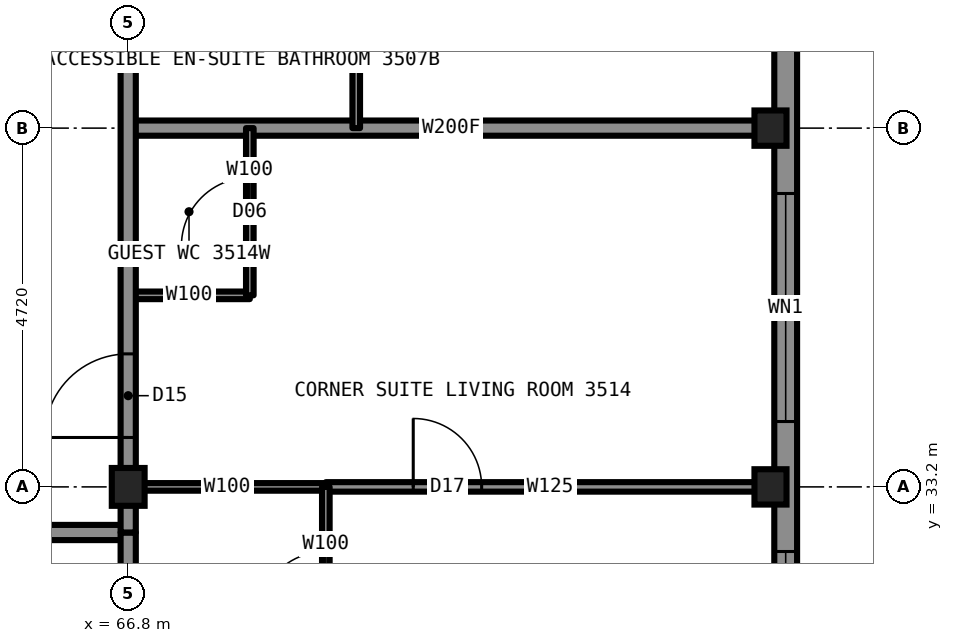
"""IFC4 building model, lengths in metres.
Left out: names, types, materials, properties, quantities, classifications, styles, units other than length and angle.
Written with IfcOpenShell. Run it as: python <this file> out.ifc"""

import sys

from ifc_helpers import new_model, si_unit, direction, frame, frame_2d, origin, origin_2d, place, context, subcontext, project, spatial, rectangle, i_section, extrude, element, fill, save


model = new_model("IFC4")
c1 = context("Model", 3, precision=1e-05, world=origin(), true_north=direction((0.0, 1.0)))
c2 = subcontext(c1, "Body", "Model", "MODEL_VIEW")
j1 = project(units=[si_unit("LENGTHUNIT", "METRE"), si_unit("PLANEANGLEUNIT", "RADIAN")], contexts=[c1])
p1 = place(None, origin())
s1 = spatial("IfcSite", under=j1, at=p1, CompositionType="ELEMENT")
p2 = place(p1, origin())
s2 = spatial("IfcBuilding", under=s1, at=p2, CompositionType="ELEMENT")
p3 = place(p2, frame((0.0, 0.0, 124.9)))
s3 = spatial("IfcBuildingStorey", under=s2, at=p3, CompositionType="ELEMENT", Elevation=124.9)
for number, where, z_axis, x_axis in (
    (1, (75.25, 33.2, 0.0), (0.0, 0.0, 1.0), (1.0, 0.0, 0.0)),
    (2, (75.25, 37.92, 0.0), (0.0, 0.0, 1.0), (1.0, 0.0, 0.0)),
):
    element("IfcColumn", number, at=place(p3, frame(where, z_axis=z_axis, x_axis=x_axis)), inside=s3, PredefinedType="COLUMN", context=c2, shape_type="SweptSolid", body=[
        extrude(i_section(OverallWidth=0.422, OverallDepth=0.465, WebThickness=0.045, FlangeThickness=0.073, at=origin_2d()), origin(), (0.0, 0.0, 1.0), 3.5),
    ])
p4 = place(p3, frame((66.8, 33.2, 0.0), z_axis=(0.0, 0.0, 1.0), x_axis=(1.0, 0.0, 0.0)))
e3 = element("IfcColumn", 3, at=p4, inside=s3, PredefinedType="COLUMN", context=c2, shape_type="SweptSolid", body=[
    extrude(i_section(OverallWidth=0.432, OverallDepth=0.498, WebThickness=0.056, FlangeThickness=0.089, at=origin_2d()), origin(), (0.0, 0.0, 1.0), 3.5),
])
p5 = place(p3, frame((66.8, 33.2, 0.0), z_axis=(0.0, 0.0, 1.0), x_axis=(1.0, 0.0, 0.0)))
e4 = element("IfcWall", 4, at=p5, inside=s3, PredefinedType="PARTITIONING", context=c2, shape_type="SweptSolid", body=[
    extrude(rectangle(XDim=2.6, YDim=0.1, at=frame_2d((1.3, 0.0))), origin(), (0.0, 0.0, 1.0), 2.573),
])
p6 = place(p3, frame((69.4, 33.2, 0.0), z_axis=(0.0, 0.0, 1.0), x_axis=(1.0, 0.0, 0.0)))
e5 = element("IfcWall", 5, at=p6, inside=s3, PredefinedType="PARTITIONING", context=c2, shape_type="SweptSolid", body=[
    extrude(rectangle(XDim=5.9, YDim=0.125, at=frame_2d((2.95, 0.0))), origin(), (0.0, 0.0, 1.0), 2.573),
])
p7 = place(p6, frame((1.15, 0.0, 0.0)))
e6 = element("IfcOpeningElement", 6, at=p7, cuts=e5, PredefinedType="OPENING", context=c2, shape_type="SweptSolid", body=[
    extrude(rectangle(XDim=0.9, YDim=2.2, at=frame_2d((0.45, 1.1))), frame((0.0, 0.073, 0.0), z_axis=(0.0, -1.0, 0.0), x_axis=(1.0, 0.0, 0.0)), (0.0, 0.0, 1.0), 0.145),
])
p8 = place(p3, frame((43.2, 32.6, 0.0), z_axis=(0.0, 0.0, 1.0), x_axis=(1.0, 0.0, 0.0)))
e7 = element("IfcWall", 7, at=p8, inside=s3, PredefinedType="PARTITIONING", context=c2, shape_type="SweptSolid", body=[
    extrude(rectangle(XDim=23.6, YDim=0.2, at=frame_2d((11.8, 0.0))), origin(), (0.0, 0.0, 1.0), 3.33),
])
p9 = place(p8, frame((3.0, 0.0, 0.0)))
e8 = element("IfcOpeningElement", 8, at=p9, cuts=e7, PredefinedType="OPENING", context=c2, shape_type="SweptSolid", body=[
    extrude(rectangle(XDim=1.0, YDim=2.2, at=frame_2d((0.5, 1.1))), frame((0.0, 0.11, 0.0), z_axis=(0.0, -1.0, 0.0), x_axis=(1.0, 0.0, 0.0)), (0.0, 0.0, 1.0), 0.22),
])
p10 = place(p8, frame((11.29, 0.0, 0.0)))
e9 = element("IfcOpeningElement", 9, at=p10, cuts=e7, PredefinedType="OPENING", context=c2, shape_type="SweptSolid", body=[
    extrude(rectangle(XDim=1.1, YDim=2.2, at=frame_2d((0.55, 1.1))), frame((0.0, 0.11, 0.0), z_axis=(0.0, -1.0, 0.0), x_axis=(1.0, 0.0, 0.0)), (0.0, 0.0, 1.0), 0.22),
])
p11 = place(p3, frame((66.8, 37.92, 0.0), z_axis=(0.0, 0.0, 1.0), x_axis=(1.0, 0.0, 0.0)))
e10 = element("IfcWall", 10, at=p11, inside=s3, PredefinedType="PARTITIONING", context=c2, shape_type="SweptSolid", body=[
    extrude(rectangle(XDim=8.5, YDim=0.2, at=frame_2d((4.25, 0.0))), origin(), (0.0, 0.0, 1.0), 2.573),
])
p12 = place(p3, frame((66.8, 35.72, 0.0), z_axis=(0.0, 0.0, 1.0), x_axis=(1.0, 0.0, 0.0)))
e11 = element("IfcWall", 11, at=p12, inside=s3, PredefinedType="PARTITIONING", context=c2, shape_type="SweptSolid", body=[
    extrude(rectangle(XDim=1.6, YDim=0.1, at=frame_2d((0.8, 0.0))), origin(), (0.0, 0.0, 1.0), 3.33),
])
p13 = place(p3, frame((66.8, 33.22, 0.0), z_axis=(0.0, 0.0, 1.0), x_axis=(0.0, 1.0, 0.0)))
e12 = element("IfcWall", 12, at=p13, inside=s3, PredefinedType="PARTITIONING", context=c2, shape_type="SweptSolid", body=[
    extrude(rectangle(XDim=23.58, YDim=0.2, at=frame_2d((11.79, 0.0))), origin(), (0.0, 0.0, 1.0), 3.33),
])
p14 = place(p13, frame((7.85, 0.0, 0.0)))
e13 = element("IfcOpeningElement", 13, at=p14, cuts=e12, PredefinedType="OPENING", context=c2, shape_type="SweptSolid", body=[
    extrude(rectangle(XDim=1.0, YDim=2.2, at=frame_2d((0.5, 1.1))), frame((0.0, 0.11, 0.0), z_axis=(0.0, -1.0, 0.0), x_axis=(1.0, 0.0, 0.0)), (0.0, 0.0, 1.0), 0.22),
])
p15 = place(p13, frame((12.42, 0.0, 0.0)))
e14 = element("IfcOpeningElement", 14, at=p15, cuts=e12, PredefinedType="OPENING", context=c2, shape_type="SweptSolid", body=[
    extrude(rectangle(XDim=1.0, YDim=2.2, at=frame_2d((0.5, 1.1))), frame((0.0, 0.11, 0.0), z_axis=(0.0, -1.0, 0.0), x_axis=(1.0, 0.0, 0.0)), (0.0, 0.0, 1.0), 0.22),
])
p16 = place(p13, frame((21.83, 0.0, 0.0)))
e15 = element("IfcOpeningElement", 15, at=p16, cuts=e12, PredefinedType="OPENING", context=c2, shape_type="SweptSolid", body=[
    extrude(rectangle(XDim=1.1, YDim=2.2, at=frame_2d((0.55, 1.1))), frame((0.0, 0.11, 0.0), z_axis=(0.0, -1.0, 0.0), x_axis=(1.0, 0.0, 0.0)), (0.0, 0.0, 1.0), 0.22),
])
p17 = place(p13, frame((0.63, 0.0, 0.0)))
e16 = element("IfcOpeningElement", 16, at=p17, cuts=e12, PredefinedType="OPENING", context=c2, shape_type="SweptSolid", body=[
    extrude(rectangle(XDim=1.1, YDim=2.2, at=frame_2d((0.55, 1.1))), frame((0.0, 0.11, 0.0), z_axis=(0.0, -1.0, 0.0), x_axis=(1.0, 0.0, 0.0)), (0.0, 0.0, 1.0), 0.22),
])
p18 = place(p3, frame((66.8, 24.7, 0.0), z_axis=(0.0, 0.0, 1.0), x_axis=(0.0, 1.0, 0.0)))
e17 = element("IfcWall", 17, at=p18, inside=s3, PredefinedType="PARTITIONING", context=c2, shape_type="SweptSolid", body=[
    extrude(rectangle(XDim=7.9, YDim=0.2, at=frame_2d((3.95, 0.0))), origin(), (0.0, 0.0, 1.0), 2.573),
])
p19 = place(p3, frame((68.4, 35.72, 0.0), z_axis=(0.0, 0.0, 1.0), x_axis=(0.0, 1.0, 0.0)))
e18 = element("IfcWall", 18, at=p19, inside=s3, PredefinedType="PARTITIONING", context=c2, shape_type="SweptSolid", body=[
    extrude(rectangle(XDim=2.2, YDim=0.1, at=frame_2d((1.1, 0.0))), origin(), (0.0, 0.0, 1.0), 3.33),
])
p20 = place(p19, frame((0.65, 0.0, 0.0)))
e19 = element("IfcOpeningElement", 19, at=p20, cuts=e18, PredefinedType="OPENING", context=c2, shape_type="SweptSolid", body=[
    extrude(rectangle(XDim=0.9, YDim=2.1, at=frame_2d((0.45, 1.05))), frame((0.0, 0.06, 0.0), z_axis=(0.0, -1.0, 0.0), x_axis=(1.0, 0.0, 0.0)), (0.0, 0.0, 1.0), 0.12),
])
p21 = place(p3, frame((69.4, 30.6, 0.0), z_axis=(0.0, 0.0, 1.0), x_axis=(0.0, 1.0, 0.0)))
e20 = element("IfcWall", 20, at=p21, inside=s3, PredefinedType="PARTITIONING", context=c2, shape_type="SweptSolid", body=[
    extrude(rectangle(XDim=2.6, YDim=0.1, at=frame_2d((1.3, 0.0))), origin(), (0.0, 0.0, 1.0), 3.33),
])
p22 = place(p21, frame((0.85, 0.0, 0.0)))
e21 = element("IfcOpeningElement", 21, at=p22, cuts=e20, PredefinedType="OPENING", context=c2, shape_type="SweptSolid", body=[
    extrude(rectangle(XDim=0.9, YDim=2.1, at=frame_2d((0.45, 1.05))), frame((0.0, 0.06, 0.0), z_axis=(0.0, -1.0, 0.0), x_axis=(1.0, 0.0, 0.0)), (0.0, 0.0, 1.0), 0.12),
])
p23 = place(p3, frame((69.8, 37.92, 0.0), z_axis=(0.0, 0.0, 1.0), x_axis=(0.0, 1.0, 0.0)))
e22 = element("IfcWall", 22, at=p23, inside=s3, PredefinedType="PARTITIONING", context=c2, shape_type="SweptSolid", body=[
    extrude(rectangle(XDim=2.9, YDim=0.1, at=frame_2d((1.45, 0.0))), origin(), (0.0, 0.0, 1.0), 3.33),
])
p24 = place(p3, frame((75.45, 29.9, 0.0), z_axis=(0.0, 0.0, 1.0), x_axis=(0.0, 1.0, 0.0)))
e23 = element("IfcWall", 23, at=p24, inside=s3, PredefinedType="SOLIDWALL", context=c2, shape_type="SweptSolid", body=[
    extrude(rectangle(XDim=30.2, YDim=0.3, at=frame_2d((15.1, 0.0))), origin(), (0.0, 0.0, 1.0), 2.83),
])
p25 = place(p24, frame((0.85, 0.0, 0.5)))
e24 = element("IfcOpeningElement", 24, at=p25, cuts=e23, PredefinedType="OPENING", context=c2, shape_type="SweptSolid", body=[
    extrude(rectangle(XDim=1.6, YDim=2.0, at=frame_2d((0.8, 1.0))), frame((0.0, 0.16, 0.0), z_axis=(0.0, -1.0, 0.0), x_axis=(1.0, 0.0, 0.0)), (0.0, 0.0, 1.0), 0.32),
])
p26 = place(p24, frame((4.16, 0.0, 0.5)))
e25 = element("IfcOpeningElement", 25, at=p26, cuts=e23, PredefinedType="OPENING", context=c2, shape_type="SweptSolid", body=[
    extrude(rectangle(XDim=3.0, YDim=2.0, at=frame_2d((1.5, 1.0))), frame((0.0, 0.16, 0.0), z_axis=(0.0, -1.0, 0.0), x_axis=(1.0, 0.0, 0.0)), (0.0, 0.0, 1.0), 0.32),
])
p27 = place(p24, frame((8.88, 0.0, 0.5)))
e26 = element("IfcOpeningElement", 26, at=p27, cuts=e23, PredefinedType="OPENING", context=c2, shape_type="SweptSolid", body=[
    extrude(rectangle(XDim=3.0, YDim=2.0, at=frame_2d((1.5, 1.0))), frame((0.0, 0.16, 0.0), z_axis=(0.0, -1.0, 0.0), x_axis=(1.0, 0.0, 0.0)), (0.0, 0.0, 1.0), 0.32),
])
p28 = place(p24, frame((18.32, 0.0, 0.5)))
e27 = element("IfcOpeningElement", 27, at=p28, cuts=e23, PredefinedType="OPENING", context=c2, shape_type="SweptSolid", body=[
    extrude(rectangle(XDim=3.0, YDim=2.0, at=frame_2d((1.5, 1.0))), frame((0.0, 0.16, 0.0), z_axis=(0.0, -1.0, 0.0), x_axis=(1.0, 0.0, 0.0)), (0.0, 0.0, 1.0), 0.32),
])
p29 = place(p24, frame((23.04, 0.0, 0.5)))
e28 = element("IfcOpeningElement", 28, at=p29, cuts=e23, PredefinedType="OPENING", context=c2, shape_type="SweptSolid", body=[
    extrude(rectangle(XDim=3.0, YDim=2.0, at=frame_2d((1.5, 1.0))), frame((0.0, 0.16, 0.0), z_axis=(0.0, -1.0, 0.0), x_axis=(1.0, 0.0, 0.0)), (0.0, 0.0, 1.0), 0.32),
])
p30 = place(p24, frame((27.75, 0.0, 0.5)))
e29 = element("IfcOpeningElement", 29, at=p30, cuts=e23, PredefinedType="OPENING", context=c2, shape_type="SweptSolid", body=[
    extrude(rectangle(XDim=1.6, YDim=2.0, at=frame_2d((0.8, 1.0))), frame((0.0, 0.16, 0.0), z_axis=(0.0, -1.0, 0.0), x_axis=(1.0, 0.0, 0.0)), (0.0, 0.0, 1.0), 0.32),
])
p31 = place(p3, frame((66.8, 32.6, 0.0), z_axis=(0.0, 0.0, 1.0), x_axis=(0.0, 1.0, 0.0)))
e30 = element("IfcWall", 30, at=p31, inside=s3, PredefinedType="PARTITIONING", context=c2, shape_type="SweptSolid", body=[
    extrude(rectangle(XDim=0.62, YDim=0.2, at=frame_2d((0.31, 0.0))), origin(), (0.0, 0.0, 1.0), 2.573),
])
p32 = place(p17, origin())
e31 = element("IfcDoor", 31, at=p32, inside=s3, OperationType="SINGLE_SWING_LEFT", PredefinedType="DOOR", context=c2, shape_type="SweptSolid", body=[
    extrude(rectangle(XDim=1.1, YDim=2.2, at=frame_2d((0.55, 1.1))), frame((0.0, 0.025, 0.0), z_axis=(0.0, -1.0, 0.0), x_axis=(1.0, 0.0, 0.0)), (0.0, 0.0, 1.0), 0.05),
])
fill(e16, e31)
p33 = place(p22, origin())
e32 = element("IfcDoor", 32, at=p33, inside=s3, OperationType="SINGLE_SWING_RIGHT", PredefinedType="DOOR", context=c2, shape_type="SweptSolid", body=[
    extrude(rectangle(XDim=0.9, YDim=2.1, at=frame_2d((0.45, 1.05))), frame((0.0, 0.025, 0.0), z_axis=(0.0, -1.0, 0.0), x_axis=(1.0, 0.0, 0.0)), (0.0, 0.0, 1.0), 0.05),
])
fill(e21, e32)
p34 = place(p7, origin())
e33 = element("IfcDoor", 33, at=p34, inside=s3, OperationType="SINGLE_SWING_LEFT", PredefinedType="DOOR", context=c2, shape_type="SweptSolid", body=[
    extrude(rectangle(XDim=0.9, YDim=2.2, at=frame_2d((0.45, 1.1))), frame((0.0, 0.025, 0.0), z_axis=(0.0, -1.0, 0.0), x_axis=(1.0, 0.0, 0.0)), (0.0, 0.0, 1.0), 0.05),
])
fill(e6, e33)
p35 = place(p20, origin())
e34 = element("IfcDoor", 34, at=p35, inside=s3, OperationType="SINGLE_SWING_LEFT", PredefinedType="DOOR", context=c2, shape_type="SweptSolid", body=[
    extrude(rectangle(XDim=0.9, YDim=2.1, at=frame_2d((0.45, 1.05))), frame((0.0, 0.025, 0.0), z_axis=(0.0, -1.0, 0.0), x_axis=(1.0, 0.0, 0.0)), (0.0, 0.0, 1.0), 0.05),
])
fill(e19, e34)
p36 = place(p25, origin())
e35 = element("IfcWindow", 35, at=p36, inside=s3, PartitioningType="SINGLE_PANEL", PredefinedType="WINDOW", context=c2, shape_type="SweptSolid", body=[
    extrude(rectangle(XDim=1.6, YDim=2.0, at=frame_2d((0.8, 1.0))), frame((0.0, 0.03, 0.0), z_axis=(0.0, -1.0, 0.0), x_axis=(1.0, 0.0, 0.0)), (0.0, 0.0, 1.0), 0.06),
])
fill(e24, e35)
p37 = place(p26, origin())
e36 = element("IfcWindow", 36, at=p37, inside=s3, PartitioningType="SINGLE_PANEL", PredefinedType="WINDOW", context=c2, shape_type="SweptSolid", body=[
    extrude(rectangle(XDim=3.0, YDim=2.0, at=frame_2d((1.5, 1.0))), frame((0.0, 0.03, 0.0), z_axis=(0.0, -1.0, 0.0), x_axis=(1.0, 0.0, 0.0)), (0.0, 0.0, 1.0), 0.06),
])
fill(e25, e36)
p38 = place(p27, origin())
e37 = element("IfcWindow", 37, at=p38, inside=s3, PartitioningType="SINGLE_PANEL", PredefinedType="WINDOW", context=c2, shape_type="SweptSolid", body=[
    extrude(rectangle(XDim=3.0, YDim=2.0, at=frame_2d((1.5, 1.0))), frame((0.0, 0.03, 0.0), z_axis=(0.0, -1.0, 0.0), x_axis=(1.0, 0.0, 0.0)), (0.0, 0.0, 1.0), 0.06),
])
fill(e26, e37)
save(model, sys.argv[1])
